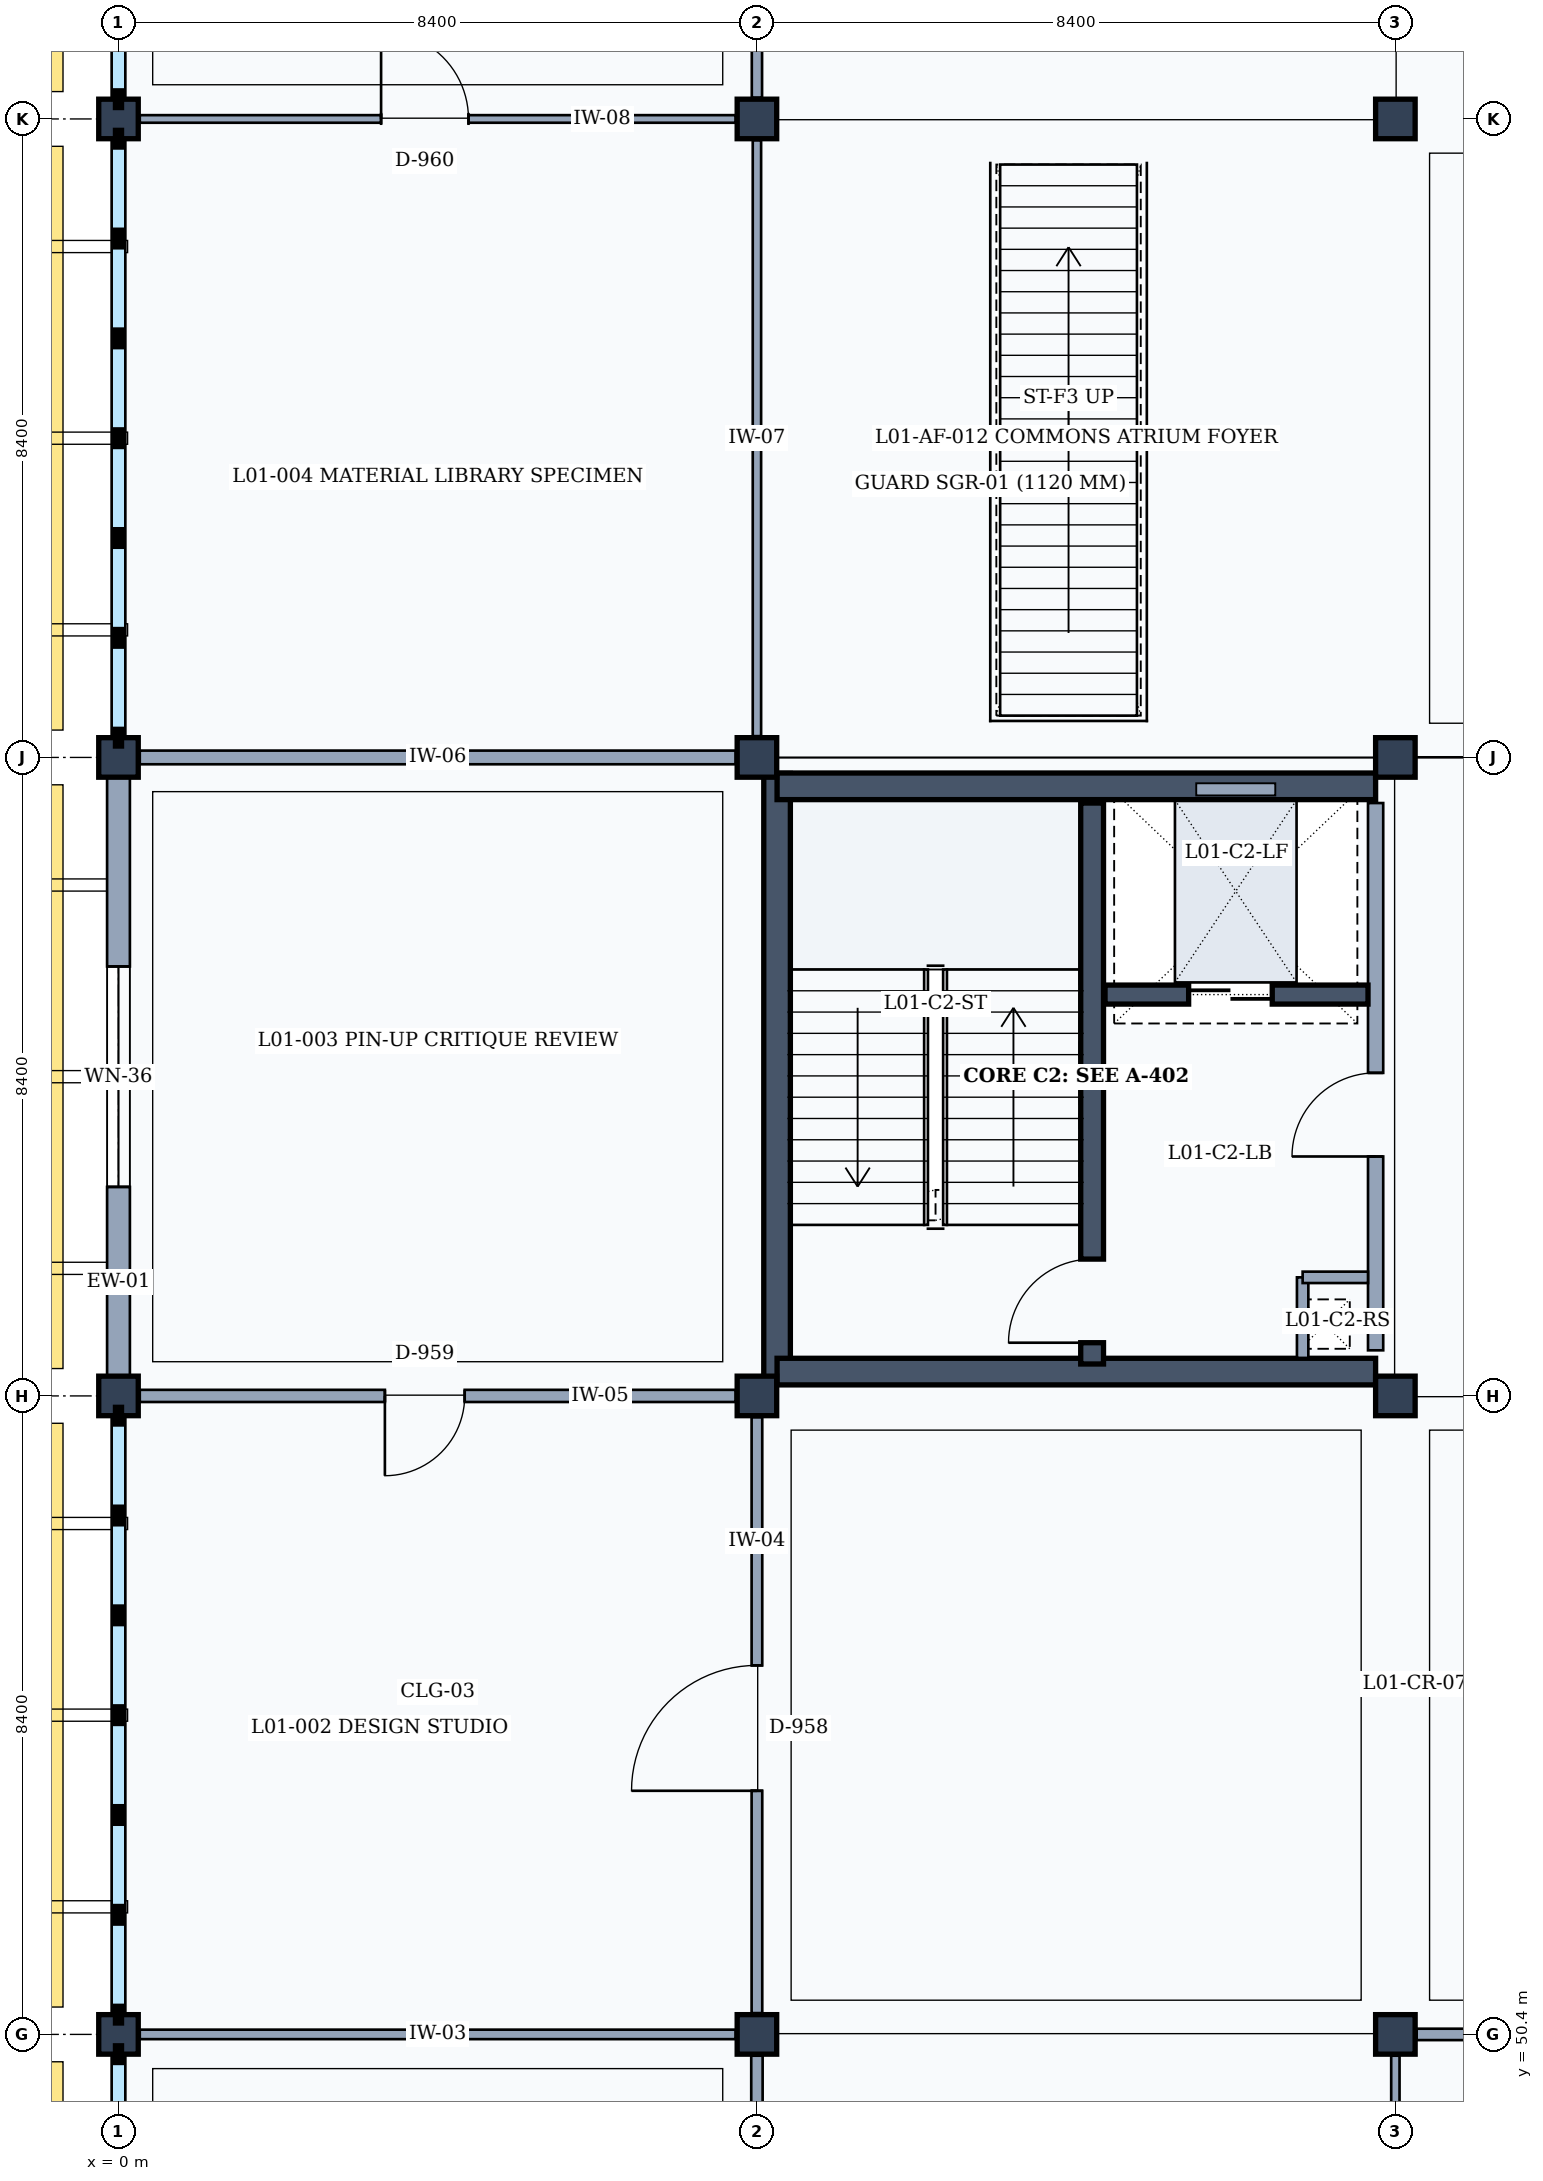
"""IFC4 building model, lengths in metres.
Left out: names, types, materials, properties, quantities, classifications, styles, units other than length and angle.
Written with IfcOpenShell. Run it as: python <this file> out.ifc"""

import sys

from ifc_helpers import new_model, si_unit, direction, frame, frame_2d, origin, origin_2d, place, context, subcontext, project, spatial, rectangle, extrude, element, fill, save


model = new_model("IFC4")
c1 = context("Model", 3, precision=1e-05, world=origin(), true_north=direction((0.0, 1.0)))
c2 = subcontext(c1, "Body", "Model", "MODEL_VIEW")
j1 = project(units=[si_unit("LENGTHUNIT", "METRE"), si_unit("PLANEANGLEUNIT", "RADIAN")], contexts=[c1])
p1 = place(None, origin())
s1 = spatial("IfcSite", under=j1, at=p1, CompositionType="ELEMENT")
p2 = place(p1, origin())
s2 = spatial("IfcBuilding", under=s1, at=p2, CompositionType="ELEMENT")
p3 = place(p2, frame((0.0, 0.0, 4.8)))
s3 = spatial("IfcBuildingStorey", under=s2, at=p3, CompositionType="ELEMENT", Elevation=4.8)
for number, where, z_axis, x_axis in (
    (1, (0.0, 50.4, 0.0), (0.0, 0.0, 1.0), (1.0, 0.0, 0.0)),
    (2, (0.0, 58.8, 0.0), (0.0, 0.0, 1.0), (1.0, 0.0, 0.0)),
    (3, (0.0, 67.2, 0.0), (0.0, 0.0, 1.0), (1.0, 0.0, 0.0)),
    (4, (0.0, 75.6, 0.0), (0.0, 0.0, 1.0), (1.0, 0.0, 0.0)),
    (5, (8.4, 50.4, 0.0), (0.0, 0.0, 1.0), (1.0, 0.0, 0.0)),
    (6, (8.4, 58.8, 0.0), (0.0, 0.0, 1.0), (1.0, 0.0, 0.0)),
    (7, (8.4, 67.2, 0.0), (0.0, 0.0, 1.0), (1.0, 0.0, 0.0)),
    (8, (8.4, 75.6, 0.0), (0.0, 0.0, 1.0), (1.0, 0.0, 0.0)),
    (9, (16.8, 50.4, 0.0), (0.0, 0.0, 1.0), (1.0, 0.0, 0.0)),
    (10, (16.8, 58.8, 0.0), (0.0, 0.0, 1.0), (1.0, 0.0, 0.0)),
    (11, (16.8, 67.2, 0.0), (0.0, 0.0, 1.0), (1.0, 0.0, 0.0)),
    (12, (16.8, 75.6, 0.0), (0.0, 0.0, 1.0), (1.0, 0.0, 0.0)),
):
    element("IfcColumn", number, at=place(p3, frame(where, z_axis=z_axis, x_axis=x_axis)), inside=s3, PredefinedType="COLUMN", context=c2, shape_type="SweptSolid", body=[
        extrude(rectangle(XDim=0.52, YDim=0.52, at=origin_2d()), origin(), (0.0, 0.0, 1.0), 4.8),
    ])
p4 = place(p3, frame((0.0, 59.06, 0.0), z_axis=(0.0, 0.0, 1.0), x_axis=(0.0, 1.0, 0.0)))
e13 = element("IfcWall", 13, at=p4, inside=s3, PredefinedType="SOLIDWALL", context=c2, shape_type="SweptSolid", body=[
    extrude(rectangle(XDim=7.88, YDim=0.3, at=frame_2d((3.94, 0.0))), origin(), (0.0, 0.0, 1.0), 3.96),
])
p5 = place(p4, frame((2.49, 0.0, 0.9)))
e14 = element("IfcOpeningElement", 14, at=p5, cuts=e13, PredefinedType="OPENING", context=c2, shape_type="SweptSolid", body=[
    extrude(rectangle(XDim=2.9, YDim=1.75, at=frame_2d((1.45, 0.875))), frame((0.0, 0.16, 0.0), z_axis=(0.0, -1.0, 0.0), x_axis=(1.0, 0.0, 0.0)), (0.0, 0.0, 1.0), 0.32),
])
p6 = place(p3, frame((8.665, 59.05, 0.0), z_axis=(0.0, 0.0, 1.0), x_axis=(0.0, 1.0, 0.0)))
e15 = element("IfcWall", 15, at=p6, inside=s3, PredefinedType="SHEAR", context=c2, shape_type="SweptSolid", body=[
    extrude(rectangle(XDim=7.94, YDim=0.35, at=frame_2d((3.97, 0.0))), origin(), (0.0, 0.0, 1.0), 4.56),
])
p7 = place(p3, frame((8.665, 66.82, 0.0), z_axis=(0.0, 0.0, 1.0), x_axis=(1.0, 0.0, 0.0)))
e16 = element("IfcWall", 16, at=p7, inside=s3, PredefinedType="SHEAR", context=c2, shape_type="SweptSolid", body=[
    extrude(rectangle(XDim=7.875, YDim=0.35, at=frame_2d((3.938, 0.0))), origin(), (0.0, 0.0, 1.0), 4.56),
])
p8 = place(p3, frame((16.54, 66.6, 0.0), z_axis=(0.0, 0.0, 1.0), x_axis=(0.0, -1.0, 0.0)))
e17 = element("IfcWall", 17, at=p8, inside=s3, PredefinedType="PARTITIONING", context=c2, shape_type="SweptSolid", body=[
    extrude(rectangle(XDim=7.2, YDim=0.2, at=frame_2d((3.6, 0.0))), origin(), (0.0, 0.0, 1.0), 3.92),
])
p9 = place(p8, frame((3.55, 0.0, 0.0)))
e18 = element("IfcOpeningElement", 18, at=p9, cuts=e17, PredefinedType="OPENING", context=c2, shape_type="SweptSolid", body=[
    extrude(rectangle(XDim=1.1, YDim=2.15, at=frame_2d((0.55, 1.075))), frame((0.0, 0.11, 0.0), z_axis=(0.0, -1.0, 0.0), x_axis=(1.0, 0.0, 0.0)), (0.0, 0.0, 1.0), 0.22),
])
p10 = place(p3, frame((16.54, 59.12, 0.0), z_axis=(0.0, 0.0, 1.0), x_axis=(-1.0, 0.0, 0.0)))
e19 = element("IfcWall", 19, at=p10, inside=s3, PredefinedType="SHEAR", context=c2, shape_type="SweptSolid", body=[
    extrude(rectangle(XDim=7.875, YDim=0.35, at=frame_2d((3.938, 0.0))), origin(), (0.0, 0.0, 1.0), 4.56),
])
p11 = place(p3, frame((12.81, 59.22, 0.0), z_axis=(0.0, 0.0, 1.0), x_axis=(0.0, 1.0, 0.0)))
e20 = element("IfcWall", 20, at=p11, inside=s3, PredefinedType="SHEAR", context=c2, shape_type="SweptSolid", body=[
    extrude(rectangle(XDim=7.38, YDim=0.3, at=frame_2d((3.69, 0.0))), origin(), (0.0, 0.0, 1.0), 4.56),
])
p12 = place(p11, frame((0.28, 0.0, 0.0)))
e21 = element("IfcOpeningElement", 21, at=p12, cuts=e20, PredefinedType="OPENING", context=c2, shape_type="SweptSolid", body=[
    extrude(rectangle(XDim=1.1, YDim=2.15, at=frame_2d((0.55, 1.075))), frame((0.0, 0.16, 0.0), z_axis=(0.0, -1.0, 0.0), x_axis=(1.0, 0.0, 0.0)), (0.0, 0.0, 1.0), 0.32),
])
p13 = place(p3, frame((15.58, 60.36, 0.0), z_axis=(0.0, 0.0, 1.0), x_axis=(0.0, -1.0, 0.0)))
e22 = element("IfcWall", 22, at=p13, inside=s3, PredefinedType="PARTITIONING", context=c2, shape_type="SweptSolid", body=[
    extrude(rectangle(XDim=1.06, YDim=0.15, at=frame_2d((0.53, 0.0))), origin(), (0.0, 0.0, 1.0), 3.92),
])
p14 = place(p3, frame((15.58, 60.36, 0.0), z_axis=(0.0, 0.0, 1.0), x_axis=(1.0, 0.0, 0.0)))
e23 = element("IfcWall", 23, at=p14, inside=s3, PredefinedType="PARTITIONING", context=c2, shape_type="SweptSolid", body=[
    extrude(rectangle(XDim=0.86, YDim=0.15, at=frame_2d((0.43, 0.0))), origin(), (0.0, 0.0, 1.0), 3.92),
])
p15 = place(p3, frame((12.98, 64.08, 0.0), z_axis=(0.0, 0.0, 1.0), x_axis=(1.0, 0.0, 0.0)))
e24 = element("IfcWall", 24, at=p15, inside=s3, PredefinedType="SHEAR", context=c2, shape_type="SweptSolid", body=[
    extrude(rectangle(XDim=3.46, YDim=0.25, at=frame_2d((1.73, 0.0))), origin(), (0.0, 0.0, 1.0), 4.56),
])
p16 = place(p15, frame((1.1, 0.0, 0.0)))
e25 = element("IfcOpeningElement", 25, at=p16, cuts=e24, PredefinedType="OPENING", context=c2, shape_type="SweptSolid", body=[
    extrude(rectangle(XDim=1.1, YDim=2.15, at=frame_2d((0.55, 1.075))), frame((0.0, 0.135, 0.0), z_axis=(0.0, -1.0, 0.0), x_axis=(1.0, 0.0, 0.0)), (0.0, 0.0, 1.0), 0.27),
])
p17 = place(p3, frame((8.4, 42.23, 0.0), z_axis=(0.0, 0.0, 1.0), x_axis=(0.0, 1.0, 0.0)))
e26 = element("IfcWall", 26, at=p17, inside=s3, PredefinedType="PARTITIONING", context=c2, shape_type="SweptSolid", body=[
    extrude(rectangle(XDim=7.89, YDim=0.15, at=frame_2d((3.945, 0.0))), origin(), (0.0, 0.0, 1.0), 3.92),
])
p18 = place(p17, frame((3.0, 0.0, 0.0)))
e27 = element("IfcOpeningElement", 27, at=p18, cuts=e26, PredefinedType="OPENING", context=c2, shape_type="SweptSolid", body=[
    extrude(rectangle(XDim=1.5, YDim=2.3, at=frame_2d((0.75, 1.15))), frame((0.0, 0.085, 0.0), z_axis=(0.0, -1.0, 0.0), x_axis=(1.0, 0.0, 0.0)), (0.0, 0.0, 1.0), 0.17),
])
p19 = place(p3, frame((0.28, 50.4, 0.0), z_axis=(0.0, 0.0, 1.0), x_axis=(1.0, 0.0, 0.0)))
e28 = element("IfcWall", 28, at=p19, inside=s3, PredefinedType="PARTITIONING", context=c2, shape_type="SweptSolid", body=[
    extrude(rectangle(XDim=7.84, YDim=0.125, at=frame_2d((3.92, 0.0))), origin(), (0.0, 0.0, 1.0), 3.92),
])
p20 = place(p3, frame((8.4, 50.68, 0.0), z_axis=(0.0, 0.0, 1.0), x_axis=(0.0, 1.0, 0.0)))
e29 = element("IfcWall", 29, at=p20, inside=s3, PredefinedType="PARTITIONING", context=c2, shape_type="SweptSolid", body=[
    extrude(rectangle(XDim=7.84, YDim=0.14, at=frame_2d((3.92, 0.0))), origin(), (0.0, 0.0, 1.0), 3.92),
])
p21 = place(p20, frame((2.925, 0.0, 0.0)))
e30 = element("IfcOpeningElement", 30, at=p21, cuts=e29, PredefinedType="OPENING", context=c2, shape_type="SweptSolid", body=[
    extrude(rectangle(XDim=1.65, YDim=2.25, at=frame_2d((0.825, 1.125))), frame((0.0, 0.08, 0.0), z_axis=(0.0, -1.0, 0.0), x_axis=(1.0, 0.0, 0.0)), (0.0, 0.0, 1.0), 0.16),
])
p22 = place(p3, frame((0.28, 58.8, 0.0), z_axis=(0.0, 0.0, 1.0), x_axis=(1.0, 0.0, 0.0)))
e31 = element("IfcWall", 31, at=p22, inside=s3, PredefinedType="PARTITIONING", context=c2, shape_type="SweptSolid", body=[
    extrude(rectangle(XDim=7.84, YDim=0.16, at=frame_2d((3.92, 0.0))), origin(), (0.0, 0.0, 1.0), 3.92),
])
p23 = place(p22, frame((3.225, 0.0, 0.0)))
e32 = element("IfcOpeningElement", 32, at=p23, cuts=e31, PredefinedType="OPENING", context=c2, shape_type="SweptSolid", body=[
    extrude(rectangle(XDim=1.05, YDim=2.2, at=frame_2d((0.525, 1.1))), frame((0.0, 0.09, 0.0), z_axis=(0.0, -1.0, 0.0), x_axis=(1.0, 0.0, 0.0)), (0.0, 0.0, 1.0), 0.18),
])
p24 = place(p3, frame((0.28, 67.2, 0.0), z_axis=(0.0, 0.0, 1.0), x_axis=(1.0, 0.0, 0.0)))
e33 = element("IfcWall", 33, at=p24, inside=s3, PredefinedType="PARTITIONING", context=c2, shape_type="SweptSolid", body=[
    extrude(rectangle(XDim=7.84, YDim=0.18, at=frame_2d((3.92, 0.0))), origin(), (0.0, 0.0, 1.0), 3.92),
])
p25 = place(p3, frame((8.4, 67.48, 0.0), z_axis=(0.0, 0.0, 1.0), x_axis=(0.0, 1.0, 0.0)))
e34 = element("IfcWall", 34, at=p25, inside=s3, PredefinedType="PARTITIONING", context=c2, shape_type="SweptSolid", body=[
    extrude(rectangle(XDim=7.84, YDim=0.11, at=frame_2d((3.92, 0.0))), origin(), (0.0, 0.0, 1.0), 3.92),
])
p26 = place(p3, frame((0.28, 75.6, 0.0), z_axis=(0.0, 0.0, 1.0), x_axis=(1.0, 0.0, 0.0)))
e35 = element("IfcWall", 35, at=p26, inside=s3, PredefinedType="MOVABLE", context=c2, shape_type="SweptSolid", body=[
    extrude(rectangle(XDim=7.84, YDim=0.1, at=frame_2d((3.92, 0.0))), origin(), (0.0, 0.0, 1.0), 3.92),
])
p27 = place(p26, frame((3.175, 0.0, 0.0)))
e36 = element("IfcOpeningElement", 36, at=p27, cuts=e35, PredefinedType="OPENING", context=c2, shape_type="SweptSolid", body=[
    extrude(rectangle(XDim=1.15, YDim=2.25, at=frame_2d((0.575, 1.125))), frame((0.0, 0.06, 0.0), z_axis=(0.0, -1.0, 0.0), x_axis=(1.0, 0.0, 0.0)), (0.0, 0.0, 1.0), 0.12),
])
p28 = place(p3, frame((8.4, 75.88, 0.0), z_axis=(0.0, 0.0, 1.0), x_axis=(0.0, 1.0, 0.0)))
e37 = element("IfcWall", 37, at=p28, inside=s3, PredefinedType="PARTITIONING", context=c2, shape_type="SweptSolid", body=[
    extrude(rectangle(XDim=7.84, YDim=0.135, at=frame_2d((3.92, 0.0))), origin(), (0.0, 0.0, 1.0), 3.92),
])
p29 = place(p28, frame((3.1, 0.0, 0.0)))
e38 = element("IfcOpeningElement", 38, at=p29, cuts=e37, PredefinedType="OPENING", context=c2, shape_type="SweptSolid", body=[
    extrude(rectangle(XDim=1.3, YDim=2.2, at=frame_2d((0.65, 1.1))), frame((0.0, 0.077, 0.0), z_axis=(0.0, -1.0, 0.0), x_axis=(1.0, 0.0, 0.0)), (0.0, 0.0, 1.0), 0.155),
])
p30 = place(p3, frame((16.8, 42.23, 0.0), z_axis=(0.0, 0.0, 1.0), x_axis=(0.0, 1.0, 0.0)))
e39 = element("IfcWall", 39, at=p30, inside=s3, PredefinedType="PARTITIONING", context=c2, shape_type="SweptSolid", body=[
    extrude(rectangle(XDim=7.89, YDim=0.11, at=frame_2d((3.945, 0.0))), origin(), (0.0, 0.0, 1.0), 3.92),
])
p31 = place(p30, frame((2.85, 0.0, 0.0)))
e40 = element("IfcOpeningElement", 40, at=p31, cuts=e39, PredefinedType="OPENING", context=c2, shape_type="SweptSolid", body=[
    extrude(rectangle(XDim=1.8, YDim=2.3, at=frame_2d((0.9, 1.15))), frame((0.0, 0.065, 0.0), z_axis=(0.0, -1.0, 0.0), x_axis=(1.0, 0.0, 0.0)), (0.0, 0.0, 1.0), 0.13),
])
p32 = place(p3, frame((17.08, 50.4, 0.0), z_axis=(0.0, 0.0, 1.0), x_axis=(1.0, 0.0, 0.0)))
e41 = element("IfcWall", 41, at=p32, inside=s3, PredefinedType="PARTITIONING", context=c2, shape_type="SweptSolid", body=[
    extrude(rectangle(XDim=7.84, YDim=0.15, at=frame_2d((3.92, 0.0))), origin(), (0.0, 0.0, 1.0), 3.92),
])
p33 = place(p5, origin())
e42 = element("IfcWindow", 42, at=p33, inside=s3, PartitioningType="SINGLE_PANEL", PredefinedType="WINDOW", context=c2, shape_type="SweptSolid", body=[
    extrude(rectangle(XDim=2.9, YDim=1.75, at=frame_2d((1.45, 0.875))), frame((0.0, 0.03, 0.0), z_axis=(0.0, -1.0, 0.0), x_axis=(1.0, 0.0, 0.0)), (0.0, 0.0, 1.0), 0.06),
])
fill(e14, e42)
p34 = place(p9, frame((1.1, 0.0, 0.0), z_axis=(0.0, 0.0, 1.0), x_axis=(-1.0, 0.0, 0.0)))
e43 = element("IfcDoor", 43, at=p34, inside=s3, OperationType="SINGLE_SWING_LEFT", PredefinedType="DOOR", context=c2, shape_type="SweptSolid", body=[
    extrude(rectangle(XDim=1.1, YDim=2.15, at=frame_2d((0.55, 1.075))), frame((0.0, 0.025, 0.0), z_axis=(0.0, -1.0, 0.0), x_axis=(1.0, 0.0, 0.0)), (0.0, 0.0, 1.0), 0.05),
])
fill(e18, e43)
p35 = place(p12, origin())
e44 = element("IfcDoor", 44, at=p35, inside=s3, OperationType="SINGLE_SWING_LEFT", PredefinedType="DOOR", context=c2, shape_type="SweptSolid", body=[
    extrude(rectangle(XDim=1.1, YDim=2.15, at=frame_2d((0.55, 1.075))), frame((0.0, 0.025, 0.0), z_axis=(0.0, -1.0, 0.0), x_axis=(1.0, 0.0, 0.0)), (0.0, 0.0, 1.0), 0.05),
])
fill(e21, e44)
p36 = place(p16, origin())
e45 = element("IfcDoor", 45, at=p36, inside=s3, OperationType="DOUBLE_DOOR_SLIDING", PredefinedType="DOOR", context=c2, shape_type="SweptSolid", body=[
    extrude(rectangle(XDim=1.1, YDim=2.15, at=frame_2d((0.55, 1.075))), frame((0.0, 0.025, 0.0), z_axis=(0.0, -1.0, 0.0), x_axis=(1.0, 0.0, 0.0)), (0.0, 0.0, 1.0), 0.05),
])
fill(e25, e45)
p37 = place(p21, origin())
e46 = element("IfcDoor", 46, at=p37, inside=s3, OperationType="SINGLE_SWING_LEFT", PredefinedType="DOOR", context=c2, shape_type="SweptSolid", body=[
    extrude(rectangle(XDim=1.65, YDim=2.25, at=frame_2d((0.825, 1.125))), frame((0.0, 0.025, 0.0), z_axis=(0.0, -1.0, 0.0), x_axis=(1.0, 0.0, 0.0)), (0.0, 0.0, 1.0), 0.05),
])
fill(e30, e46)
p38 = place(p23, frame((1.05, 0.0, 0.0), z_axis=(0.0, 0.0, 1.0), x_axis=(-1.0, 0.0, 0.0)))
e47 = element("IfcDoor", 47, at=p38, inside=s3, OperationType="SINGLE_SWING_RIGHT", PredefinedType="DOOR", context=c2, shape_type="SweptSolid", body=[
    extrude(rectangle(XDim=1.05, YDim=2.2, at=frame_2d((0.525, 1.1))), frame((0.0, 0.025, 0.0), z_axis=(0.0, -1.0, 0.0), x_axis=(1.0, 0.0, 0.0)), (0.0, 0.0, 1.0), 0.05),
])
fill(e32, e47)
p39 = place(p27, origin())
e48 = element("IfcDoor", 48, at=p39, inside=s3, OperationType="SINGLE_SWING_LEFT", PredefinedType="DOOR", context=c2, shape_type="SweptSolid", body=[
    extrude(rectangle(XDim=1.15, YDim=2.25, at=frame_2d((0.575, 1.125))), frame((0.0, 0.025, 0.0), z_axis=(0.0, -1.0, 0.0), x_axis=(1.0, 0.0, 0.0)), (0.0, 0.0, 1.0), 0.05),
])
fill(e36, e48)
save(model, sys.argv[1])
